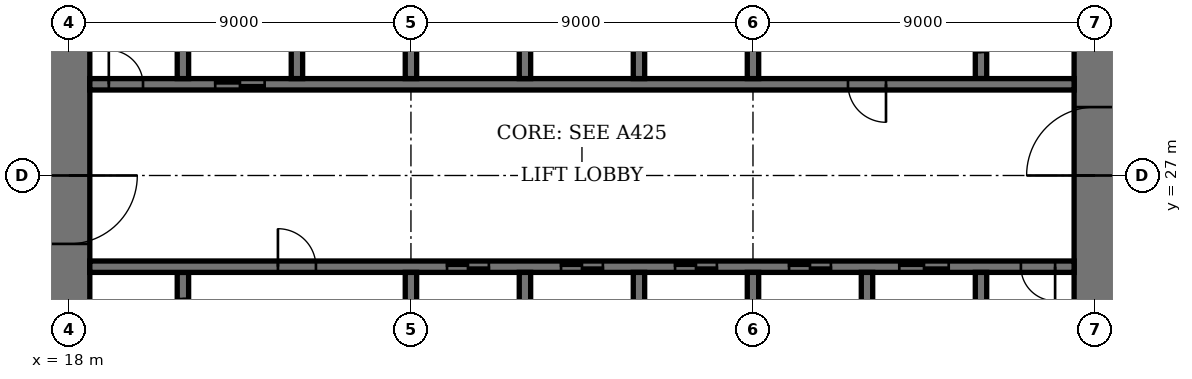
"""IFC4 building model, lengths in metres.
Left out: names, types, materials, properties, quantities, classifications, styles, units other than length and angle.
Written with IfcOpenShell. Run it as: python <this file> out.ifc"""

import sys

from ifc_helpers import new_model, si_unit, direction, frame, frame_2d, origin, place, context, subcontext, project, spatial, rectangle, extrude, element, fill, save


model = new_model("IFC4")
c1 = context("Model", 3, precision=1e-05, world=origin(), true_north=direction((0.0, 1.0)))
c2 = subcontext(c1, "Body", "Model", "MODEL_VIEW")
j1 = project(units=[si_unit("LENGTHUNIT", "METRE"), si_unit("PLANEANGLEUNIT", "RADIAN")], contexts=[c1])
p1 = place(None, origin())
s1 = spatial("IfcSite", under=j1, at=p1, CompositionType="ELEMENT")
p2 = place(p1, origin())
s2 = spatial("IfcBuilding", under=s1, at=p2, CompositionType="ELEMENT")
p3 = place(p2, frame((0.0, 0.0, 31.8)))
s3 = spatial("IfcBuildingStorey", under=s2, at=p3, CompositionType="ELEMENT", Elevation=31.8)
p4 = place(p3, frame((18.0, 35.45, 0.0), z_axis=(0.0, 0.0, 1.0), x_axis=(0.0, -1.0, 0.0)))
e1 = element("IfcWall", 1, at=p4, inside=s3, PredefinedType="SHEAR", context=c2, shape_type="SweptSolid", body=[
    extrude(rectangle(XDim=16.9, YDim=1.1, at=frame_2d((8.45, 0.0))), origin(), (0.0, 0.0, 1.0), 4.0),
])
p5 = place(p4, frame((8.45, 0.0, 0.0)))
e2 = element("IfcOpeningElement", 2, at=p5, cuts=e1, PredefinedType="OPENING", context=c2, shape_type="SweptSolid", body=[
    extrude(rectangle(XDim=1.8, YDim=2.4, at=frame_2d((0.9, 1.2))), frame((0.0, 0.56, 0.0), z_axis=(0.0, -1.0, 0.0), x_axis=(1.0, 0.0, 0.0)), (0.0, 0.0, 1.0), 1.12),
])
p6 = place(p3, frame((45.0, 18.55, 0.0), z_axis=(0.0, 0.0, 1.0), x_axis=(0.0, 1.0, 0.0)))
e3 = element("IfcWall", 3, at=p6, inside=s3, PredefinedType="SHEAR", context=c2, shape_type="SweptSolid", body=[
    extrude(rectangle(XDim=16.9, YDim=1.1, at=frame_2d((8.45, 0.0))), origin(), (0.0, 0.0, 1.0), 4.0),
])
p7 = place(p6, frame((8.45, 0.0, 0.0)))
e4 = element("IfcOpeningElement", 4, at=p7, cuts=e3, PredefinedType="OPENING", context=c2, shape_type="SweptSolid", body=[
    extrude(rectangle(XDim=1.8, YDim=2.4, at=frame_2d((0.9, 1.2))), frame((0.0, 0.56, 0.0), z_axis=(0.0, -1.0, 0.0), x_axis=(1.0, 0.0, 0.0)), (0.0, 0.0, 1.0), 1.12),
])
p8 = place(p3, frame((21.0, 21.95, 0.0), z_axis=(0.0, 0.0, 1.0), x_axis=(0.0, 1.0, 0.0)))
e5 = element("IfcWall", 5, at=p8, inside=s3, PredefinedType="SHEAR", context=c2, shape_type="SweptSolid", body=[
    extrude(rectangle(XDim=2.5, YDim=0.3, at=frame_2d((1.25, 0.0))), origin(), (0.0, 0.0, 1.0), 4.0),
])
p9 = place(p8, frame((0.7, 0.0, 0.0)))
e6 = element("IfcOpeningElement", 6, at=p9, cuts=e5, PredefinedType="OPENING", context=c2, shape_type="SweptSolid", body=[
    extrude(rectangle(XDim=1.1, YDim=2.4, at=frame_2d((0.55, 1.2))), frame((0.0, 0.16, 0.0), z_axis=(0.0, -1.0, 0.0), x_axis=(1.0, 0.0, 0.0)), (0.0, 0.0, 1.0), 0.32),
])
p10 = place(p3, frame((42.0, 29.55, 0.0), z_axis=(0.0, 0.0, 1.0), x_axis=(0.0, 1.0, 0.0)))
e7 = element("IfcWall", 7, at=p10, inside=s3, PredefinedType="SHEAR", context=c2, shape_type="SweptSolid", body=[
    extrude(rectangle(XDim=2.5, YDim=0.3, at=frame_2d((1.25, 0.0))), origin(), (0.0, 0.0, 1.0), 4.0),
])
p11 = place(p10, frame((0.7, 0.0, 0.0)))
e8 = element("IfcOpeningElement", 8, at=p11, cuts=e7, PredefinedType="OPENING", context=c2, shape_type="SweptSolid", body=[
    extrude(rectangle(XDim=1.1, YDim=2.4, at=frame_2d((0.55, 1.2))), frame((0.0, 0.16, 0.0), z_axis=(0.0, -1.0, 0.0), x_axis=(1.0, 0.0, 0.0)), (0.0, 0.0, 1.0), 0.32),
])
p12 = place(p3, frame((18.55, 24.6, 0.0), z_axis=(0.0, 0.0, 1.0), x_axis=(1.0, 0.0, 0.0)))
e9 = element("IfcWall", 9, at=p12, inside=s3, PredefinedType="SHEAR", context=c2, shape_type="SweptSolid", body=[
    extrude(rectangle(XDim=25.9, YDim=0.3, at=frame_2d((12.95, 0.0))), origin(), (0.0, 0.0, 1.0), 4.0),
])
p13 = place(p12, frame((4.95, 0.0, 0.0)))
e10 = element("IfcOpeningElement", 10, at=p13, cuts=e9, PredefinedType="OPENING", context=c2, shape_type="SweptSolid", body=[
    extrude(rectangle(XDim=1.0, YDim=2.4, at=frame_2d((0.5, 1.2))), frame((0.0, 0.16, 0.0), z_axis=(0.0, -1.0, 0.0), x_axis=(1.0, 0.0, 0.0)), (0.0, 0.0, 1.0), 0.32),
])
p14 = place(p12, frame((24.5, 0.0, 0.0)))
e11 = element("IfcOpeningElement", 11, at=p14, cuts=e9, PredefinedType="OPENING", context=c2, shape_type="SweptSolid", body=[
    extrude(rectangle(XDim=0.9, YDim=2.1, at=frame_2d((0.45, 1.05))), frame((0.0, 0.16, 0.0), z_axis=(0.0, -1.0, 0.0), x_axis=(1.0, 0.0, 0.0)), (0.0, 0.0, 1.0), 0.32),
])
p15 = place(p12, frame((9.4, 0.0, 0.0)))
e12 = element("IfcOpeningElement", 12, at=p15, cuts=e9, PredefinedType="OPENING", context=c2, shape_type="SweptSolid", body=[
    extrude(rectangle(XDim=1.1, YDim=2.4, at=frame_2d((0.55, 1.2))), frame((0.0, 0.16, 0.0), z_axis=(0.0, -1.0, 0.0), x_axis=(1.0, 0.0, 0.0)), (0.0, 0.0, 1.0), 0.32),
])
p16 = place(p12, frame((12.4, 0.0, 0.0)))
e13 = element("IfcOpeningElement", 13, at=p16, cuts=e9, PredefinedType="OPENING", context=c2, shape_type="SweptSolid", body=[
    extrude(rectangle(XDim=1.1, YDim=2.4, at=frame_2d((0.55, 1.2))), frame((0.0, 0.16, 0.0), z_axis=(0.0, -1.0, 0.0), x_axis=(1.0, 0.0, 0.0)), (0.0, 0.0, 1.0), 0.32),
])
p17 = place(p12, frame((15.4, 0.0, 0.0)))
e14 = element("IfcOpeningElement", 14, at=p17, cuts=e9, PredefinedType="OPENING", context=c2, shape_type="SweptSolid", body=[
    extrude(rectangle(XDim=1.1, YDim=2.4, at=frame_2d((0.55, 1.2))), frame((0.0, 0.16, 0.0), z_axis=(0.0, -1.0, 0.0), x_axis=(1.0, 0.0, 0.0)), (0.0, 0.0, 1.0), 0.32),
])
p18 = place(p12, frame((18.4, 0.0, 0.0)))
e15 = element("IfcOpeningElement", 15, at=p18, cuts=e9, PredefinedType="OPENING", context=c2, shape_type="SweptSolid", body=[
    extrude(rectangle(XDim=1.1, YDim=2.4, at=frame_2d((0.55, 1.2))), frame((0.0, 0.16, 0.0), z_axis=(0.0, -1.0, 0.0), x_axis=(1.0, 0.0, 0.0)), (0.0, 0.0, 1.0), 0.32),
])
p19 = place(p12, frame((21.3, 0.0, 0.0)))
e16 = element("IfcOpeningElement", 16, at=p19, cuts=e9, PredefinedType="OPENING", context=c2, shape_type="SweptSolid", body=[
    extrude(rectangle(XDim=1.3, YDim=2.4, at=frame_2d((0.65, 1.2))), frame((0.0, 0.16, 0.0), z_axis=(0.0, -1.0, 0.0), x_axis=(1.0, 0.0, 0.0)), (0.0, 0.0, 1.0), 0.32),
])
p20 = place(p3, frame((18.55, 29.4, 0.0), z_axis=(0.0, 0.0, 1.0), x_axis=(1.0, 0.0, 0.0)))
e17 = element("IfcWall", 17, at=p20, inside=s3, PredefinedType="SHEAR", context=c2, shape_type="SweptSolid", body=[
    extrude(rectangle(XDim=25.9, YDim=0.3, at=frame_2d((12.95, 0.0))), origin(), (0.0, 0.0, 1.0), 4.0),
])
p21 = place(p20, frame((19.95, 0.0, 0.0)))
e18 = element("IfcOpeningElement", 18, at=p21, cuts=e17, PredefinedType="OPENING", context=c2, shape_type="SweptSolid", body=[
    extrude(rectangle(XDim=1.0, YDim=2.4, at=frame_2d((0.5, 1.2))), frame((0.0, 0.16, 0.0), z_axis=(0.0, -1.0, 0.0), x_axis=(1.0, 0.0, 0.0)), (0.0, 0.0, 1.0), 0.32),
])
p22 = place(p20, frame((0.5, 0.0, 0.0)))
e19 = element("IfcOpeningElement", 19, at=p22, cuts=e17, PredefinedType="OPENING", context=c2, shape_type="SweptSolid", body=[
    extrude(rectangle(XDim=0.9, YDim=2.1, at=frame_2d((0.45, 1.05))), frame((0.0, 0.16, 0.0), z_axis=(0.0, -1.0, 0.0), x_axis=(1.0, 0.0, 0.0)), (0.0, 0.0, 1.0), 0.32),
])
p23 = place(p20, frame((3.3, 0.0, 0.0)))
e20 = element("IfcOpeningElement", 20, at=p23, cuts=e17, PredefinedType="OPENING", context=c2, shape_type="SweptSolid", body=[
    extrude(rectangle(XDim=1.3, YDim=2.4, at=frame_2d((0.65, 1.2))), frame((0.0, 0.16, 0.0), z_axis=(0.0, -1.0, 0.0), x_axis=(1.0, 0.0, 0.0)), (0.0, 0.0, 1.0), 0.32),
])
for number, where, z_axis, x_axis in (
    (21, (30.0, 21.75, 0.0), (0.0, 0.0, 1.0), (0.0, 1.0, 0.0)),
    (22, (33.0, 29.55, 0.0), (0.0, 0.0, 1.0), (0.0, 1.0, 0.0)),
    (23, (33.0, 21.75, 0.0), (0.0, 0.0, 1.0), (0.0, 1.0, 0.0)),
    (24, (30.0, 29.55, 0.0), (0.0, 0.0, 1.0), (0.0, 1.0, 0.0)),
    (25, (36.0, 21.75, 0.0), (0.0, 0.0, 1.0), (0.0, 1.0, 0.0)),
    (26, (27.0, 29.55, 0.0), (0.0, 0.0, 1.0), (0.0, 1.0, 0.0)),
):
    element("IfcWall", number, at=place(p3, frame(where, z_axis=z_axis, x_axis=x_axis)), inside=s3, PredefinedType="SHEAR", context=c2, shape_type="SweptSolid", body=[
        extrude(rectangle(XDim=2.7, YDim=0.3, at=frame_2d((1.35, 0.0))), origin(), (0.0, 0.0, 1.0), 4.0),
    ])
for number, where, z_axis, x_axis in (
    (27, (39.0, 18.55, 0.0), (0.0, 0.0, 1.0), (0.0, 1.0, 0.0)),
    (28, (24.0, 29.55, 0.0), (0.0, 0.0, 1.0), (0.0, 1.0, 0.0)),
):
    element("IfcWall", number, at=place(p3, frame(where, z_axis=z_axis, x_axis=x_axis)), inside=s3, PredefinedType="SHEAR", context=c2, shape_type="SweptSolid", body=[
        extrude(rectangle(XDim=5.9, YDim=0.3, at=frame_2d((2.95, 0.0))), origin(), (0.0, 0.0, 1.0), 4.0),
    ])
for number, where, z_axis, x_axis in (
    (29, (42.0, 21.75, 0.0), (0.0, 0.0, 1.0), (0.0, 1.0, 0.0)),
    (30, (21.0, 29.55, 0.0), (0.0, 0.0, 1.0), (0.0, 1.0, 0.0)),
):
    element("IfcWall", number, at=place(p3, frame(where, z_axis=z_axis, x_axis=x_axis)), inside=s3, PredefinedType="SHEAR", context=c2, shape_type="SweptSolid", body=[
        extrude(rectangle(XDim=2.7, YDim=0.3, at=frame_2d((1.35, 0.0))), origin(), (0.0, 0.0, 1.0), 4.0),
    ])
for number, where, z_axis, x_axis in (
    (31, (27.0, 21.6, 0.0), (0.0, 0.0, 1.0), (0.0, 1.0, 0.0)),
    (32, (36.0, 29.55, 0.0), (0.0, 0.0, 1.0), (0.0, 1.0, 0.0)),
):
    element("IfcWall", number, at=place(p3, frame(where, z_axis=z_axis, x_axis=x_axis)), inside=s3, PredefinedType="SHEAR", context=c2, shape_type="SweptSolid", body=[
        extrude(rectangle(XDim=2.85, YDim=0.3, at=frame_2d((1.425, 0.0))), origin(), (0.0, 0.0, 1.0), 4.0),
    ])
p24 = place(p5, origin())
e33 = element("IfcDoor", 33, at=p24, inside=s3, OperationType="DOUBLE_DOOR_DOUBLE_SWING", PredefinedType="DOOR", context=c2, shape_type="SweptSolid", body=[
    extrude(rectangle(XDim=1.8, YDim=2.4, at=frame_2d((0.9, 1.2))), frame((0.0, 0.03, 0.0), z_axis=(0.0, -1.0, 0.0), x_axis=(1.0, 0.0, 0.0)), (0.0, 0.0, 1.0), 0.06),
    extrude(rectangle(XDim=0.04, YDim=2.4, at=frame_2d((0.02, 1.2))), frame((0.0, 0.55, 0.0), z_axis=(0.0, -1.0, 0.0), x_axis=(1.0, 0.0, 0.0)), (0.0, 0.0, 1.0), 1.1),
    extrude(rectangle(XDim=0.04, YDim=2.4, at=frame_2d((1.78, 1.2))), frame((0.0, 0.55, 0.0), z_axis=(0.0, -1.0, 0.0), x_axis=(1.0, 0.0, 0.0)), (0.0, 0.0, 1.0), 1.1),
    extrude(rectangle(XDim=1.8, YDim=0.04, at=frame_2d((0.9, 2.38))), frame((0.0, 0.55, 0.0), z_axis=(0.0, -1.0, 0.0), x_axis=(1.0, 0.0, 0.0)), (0.0, 0.0, 1.0), 1.1),
])
fill(e2, e33)
p25 = place(p7, origin())
e34 = element("IfcDoor", 34, at=p25, inside=s3, OperationType="DOUBLE_DOOR_DOUBLE_SWING", PredefinedType="DOOR", context=c2, shape_type="SweptSolid", body=[
    extrude(rectangle(XDim=1.8, YDim=2.4, at=frame_2d((0.9, 1.2))), frame((0.0, 0.03, 0.0), z_axis=(0.0, -1.0, 0.0), x_axis=(1.0, 0.0, 0.0)), (0.0, 0.0, 1.0), 0.06),
    extrude(rectangle(XDim=0.04, YDim=2.4, at=frame_2d((0.02, 1.2))), frame((0.0, 0.55, 0.0), z_axis=(0.0, -1.0, 0.0), x_axis=(1.0, 0.0, 0.0)), (0.0, 0.0, 1.0), 1.1),
    extrude(rectangle(XDim=0.04, YDim=2.4, at=frame_2d((1.78, 1.2))), frame((0.0, 0.55, 0.0), z_axis=(0.0, -1.0, 0.0), x_axis=(1.0, 0.0, 0.0)), (0.0, 0.0, 1.0), 1.1),
    extrude(rectangle(XDim=1.8, YDim=0.04, at=frame_2d((0.9, 2.38))), frame((0.0, 0.55, 0.0), z_axis=(0.0, -1.0, 0.0), x_axis=(1.0, 0.0, 0.0)), (0.0, 0.0, 1.0), 1.1),
])
fill(e4, e34)
p26 = place(p13, origin())
e35 = element("IfcDoor", 35, at=p26, inside=s3, OperationType="SINGLE_SWING_RIGHT", PredefinedType="DOOR", context=c2, shape_type="SweptSolid", body=[
    extrude(rectangle(XDim=1.0, YDim=2.4, at=frame_2d((0.5, 1.2))), frame((0.0, 0.03, 0.0), z_axis=(0.0, -1.0, 0.0), x_axis=(1.0, 0.0, 0.0)), (0.0, 0.0, 1.0), 0.06),
])
fill(e10, e35)
p27 = place(p21, origin())
e36 = element("IfcDoor", 36, at=p27, inside=s3, OperationType="SINGLE_SWING_RIGHT", PredefinedType="DOOR", context=c2, shape_type="SweptSolid", body=[
    extrude(rectangle(XDim=1.0, YDim=2.4, at=frame_2d((0.5, 1.2))), frame((0.0, 0.03, 0.0), z_axis=(0.0, -1.0, 0.0), x_axis=(1.0, 0.0, 0.0)), (0.0, 0.0, 1.0), 0.06),
])
fill(e18, e36)
p28 = place(p14, origin())
e37 = element("IfcDoor", 37, at=p28, inside=s3, OperationType="SINGLE_SWING_RIGHT", PredefinedType="DOOR", context=c2, shape_type="SweptSolid", body=[
    extrude(rectangle(XDim=0.9, YDim=2.1, at=frame_2d((0.45, 1.05))), frame((0.0, 0.03, 0.0), z_axis=(0.0, -1.0, 0.0), x_axis=(1.0, 0.0, 0.0)), (0.0, 0.0, 1.0), 0.06),
])
fill(e11, e37)
p29 = place(p22, origin())
e38 = element("IfcDoor", 38, at=p29, inside=s3, OperationType="SINGLE_SWING_RIGHT", PredefinedType="DOOR", context=c2, shape_type="SweptSolid", body=[
    extrude(rectangle(XDim=0.9, YDim=2.1, at=frame_2d((0.45, 1.05))), frame((0.0, 0.03, 0.0), z_axis=(0.0, -1.0, 0.0), x_axis=(1.0, 0.0, 0.0)), (0.0, 0.0, 1.0), 0.06),
])
fill(e19, e38)
p30 = place(p15, origin())
e39 = element("IfcDoor", 39, at=p30, inside=s3, OperationType="DOUBLE_DOOR_SLIDING", PredefinedType="DOOR", context=c2, shape_type="SweptSolid", body=[
    extrude(rectangle(XDim=1.1, YDim=2.4, at=frame_2d((0.55, 1.2))), frame((0.0, 0.02, 0.0), z_axis=(0.0, -1.0, 0.0), x_axis=(1.0, 0.0, 0.0)), (0.0, 0.0, 1.0), 0.04),
])
fill(e12, e39)
p31 = place(p16, origin())
e40 = element("IfcDoor", 40, at=p31, inside=s3, OperationType="DOUBLE_DOOR_SLIDING", PredefinedType="DOOR", context=c2, shape_type="SweptSolid", body=[
    extrude(rectangle(XDim=1.1, YDim=2.4, at=frame_2d((0.55, 1.2))), frame((0.0, 0.02, 0.0), z_axis=(0.0, -1.0, 0.0), x_axis=(1.0, 0.0, 0.0)), (0.0, 0.0, 1.0), 0.04),
])
fill(e13, e40)
p32 = place(p17, origin())
e41 = element("IfcDoor", 41, at=p32, inside=s3, OperationType="DOUBLE_DOOR_SLIDING", PredefinedType="DOOR", context=c2, shape_type="SweptSolid", body=[
    extrude(rectangle(XDim=1.1, YDim=2.4, at=frame_2d((0.55, 1.2))), frame((0.0, 0.02, 0.0), z_axis=(0.0, -1.0, 0.0), x_axis=(1.0, 0.0, 0.0)), (0.0, 0.0, 1.0), 0.04),
])
fill(e14, e41)
p33 = place(p18, origin())
e42 = element("IfcDoor", 42, at=p33, inside=s3, OperationType="DOUBLE_DOOR_SLIDING", PredefinedType="DOOR", context=c2, shape_type="SweptSolid", body=[
    extrude(rectangle(XDim=1.1, YDim=2.4, at=frame_2d((0.55, 1.2))), frame((0.0, 0.02, 0.0), z_axis=(0.0, -1.0, 0.0), x_axis=(1.0, 0.0, 0.0)), (0.0, 0.0, 1.0), 0.04),
])
fill(e15, e42)
p34 = place(p19, origin())
e43 = element("IfcDoor", 43, at=p34, inside=s3, OperationType="DOUBLE_DOOR_SLIDING", PredefinedType="DOOR", context=c2, shape_type="SweptSolid", body=[
    extrude(rectangle(XDim=1.3, YDim=2.4, at=frame_2d((0.65, 1.2))), frame((0.0, 0.02, 0.0), z_axis=(0.0, -1.0, 0.0), x_axis=(1.0, 0.0, 0.0)), (0.0, 0.0, 1.0), 0.04),
])
fill(e16, e43)
p35 = place(p23, origin())
e44 = element("IfcDoor", 44, at=p35, inside=s3, OperationType="DOUBLE_DOOR_SLIDING", PredefinedType="DOOR", context=c2, shape_type="SweptSolid", body=[
    extrude(rectangle(XDim=1.3, YDim=2.4, at=frame_2d((0.65, 1.2))), frame((0.0, 0.02, 0.0), z_axis=(0.0, -1.0, 0.0), x_axis=(1.0, 0.0, 0.0)), (0.0, 0.0, 1.0), 0.04),
])
fill(e20, e44)
save(model, sys.argv[1])
